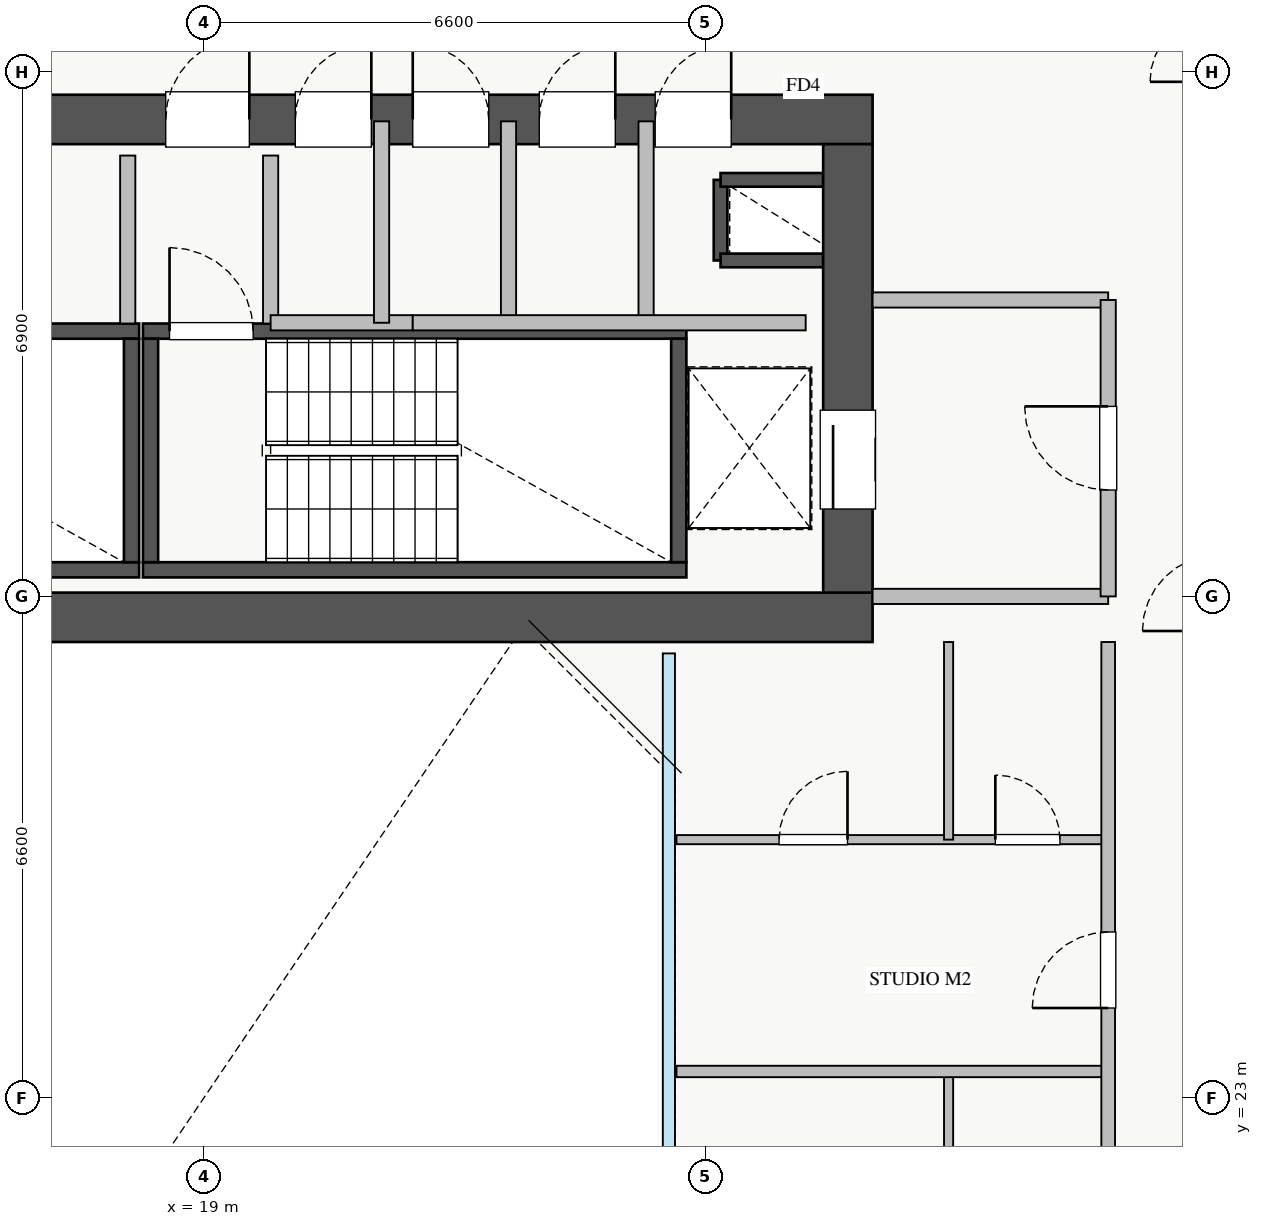
"""IFC4 building model, lengths in metres.
Left out: names, types, materials, properties, quantities, classifications, styles, units other than length and angle.
Written with IfcOpenShell. Run it as: python <this file> out.ifc"""

import sys

from ifc_helpers import new_model, si_unit, direction, frame, frame_2d, origin, place, context, subcontext, project, spatial, rectangle, extrude, source, transform, mapped, element, fill, save


model = new_model("IFC4")
c1 = context("Model", 3, precision=1e-05, world=origin(), true_north=direction((0.0, 1.0)))
c2 = subcontext(c1, "Body", "Model", "MODEL_VIEW")
j1 = project(units=[si_unit("LENGTHUNIT", "METRE"), si_unit("PLANEANGLEUNIT", "RADIAN")], contexts=[c1])
p1 = place(None, origin())
s1 = spatial("IfcSite", under=j1, at=p1, CompositionType="ELEMENT")
p2 = place(p1, origin())
s2 = spatial("IfcBuilding", under=s1, at=p2, CompositionType="ELEMENT")
p3 = place(p2, frame((0.0, 0.0, 123.0)))
s3 = spatial("IfcBuildingStorey", under=s2, at=p3, CompositionType="ELEMENT", Elevation=123.0)
p4 = place(p3, frame((25.8, 34.02, 0.0), z_axis=(0.0, 0.0, 1.0), x_axis=(0.0, 1.0, 0.0)))
e1 = element("IfcWall", 1, at=p4, inside=s3, PredefinedType="SHEAR", context=c2, shape_type="SweptSolid", body=[
    extrude(rectangle(XDim=1.06, YDim=0.18, at=frame_2d((0.53, 0.0))), origin(), (0.0, 0.0, 1.0), 3.07),
])
for number, where, z_axis, x_axis in (
    (2, (25.8, 35.08, 0.0), (0.0, 0.0, 1.0), (1.0, 0.0, 0.0)),
    (3, (25.8, 34.02, 0.0), (0.0, 0.0, 1.0), (1.0, 0.0, 0.0)),
):
    element("IfcWall", number, at=place(p3, frame(where, z_axis=z_axis, x_axis=x_axis)), inside=s3, PredefinedType="SHEAR", context=c2, shape_type="SweptSolid", body=[
        extrude(rectangle(XDim=1.35, YDim=0.18, at=frame_2d((0.675, 0.0))), origin(), (0.0, 0.0, 1.0), 3.07),
    ])
p5 = place(p3, frame((10.85, 29.95, 0.0), z_axis=(0.0, 0.0, 1.0), x_axis=(1.0, 0.0, 0.0)))
e4 = element("IfcWall", 4, at=p5, inside=s3, PredefinedType="SHEAR", context=c2, shape_type="SweptSolid", body=[
    extrude(rectangle(XDim=7.3, YDim=0.2, at=frame_2d((3.65, 0.0))), origin(), (0.0, 0.0, 1.0), 3.25),
])
p6 = place(p3, frame((10.85, 33.09, 0.0), z_axis=(0.0, 0.0, 1.0), x_axis=(1.0, 0.0, 0.0)))
e5 = element("IfcWall", 5, at=p6, inside=s3, PredefinedType="SHEAR", context=c2, shape_type="SweptSolid", body=[
    extrude(rectangle(XDim=7.3, YDim=0.2, at=frame_2d((3.65, 0.0))), origin(), (0.0, 0.0, 1.0), 3.25),
])
p7 = place(p6, frame((0.35, 0.0, 0.0)))
e6 = element("IfcOpeningElement", 6, at=p7, cuts=e5, PredefinedType="OPENING", context=c2, shape_type="SweptSolid", body=[
    extrude(rectangle(XDim=1.1, YDim=2.05, at=frame_2d((0.55, 1.025))), frame((0.0, 0.11, 0.0), z_axis=(0.0, -1.0, 0.0), x_axis=(1.0, 0.0, 0.0)), (0.0, 0.0, 1.0), 0.22),
])
p8 = place(p3, frame((18.05, 30.05, 0.0), z_axis=(0.0, 0.0, 1.0), x_axis=(0.0, 1.0, 0.0)))
e7 = element("IfcWall", 7, at=p8, inside=s3, PredefinedType="SHEAR", context=c2, shape_type="SweptSolid", body=[
    extrude(rectangle(XDim=2.94, YDim=0.2, at=frame_2d((1.47, 0.0))), origin(), (0.0, 0.0, 1.0), 3.25),
])
p9 = place(p3, frame((18.2, 29.95, 0.0), z_axis=(0.0, 0.0, 1.0), x_axis=(1.0, 0.0, 0.0)))
e8 = element("IfcWall", 8, at=p9, inside=s3, PredefinedType="SHEAR", context=c2, shape_type="SweptSolid", body=[
    extrude(rectangle(XDim=7.15, YDim=0.2, at=frame_2d((3.575, 0.0))), origin(), (0.0, 0.0, 1.0), 3.25),
])
p10 = place(p3, frame((18.2, 33.09, 0.0), z_axis=(0.0, 0.0, 1.0), x_axis=(1.0, 0.0, 0.0)))
e9 = element("IfcWall", 9, at=p10, inside=s3, PredefinedType="SHEAR", context=c2, shape_type="SweptSolid", body=[
    extrude(rectangle(XDim=7.15, YDim=0.2, at=frame_2d((3.575, 0.0))), origin(), (0.0, 0.0, 1.0), 3.25),
])
p11 = place(p10, frame((0.35, 0.0, 0.0)))
e10 = element("IfcOpeningElement", 10, at=p11, cuts=e9, PredefinedType="OPENING", context=c2, shape_type="SweptSolid", body=[
    extrude(rectangle(XDim=1.1, YDim=2.05, at=frame_2d((0.55, 1.025))), frame((0.0, 0.11, 0.0), z_axis=(0.0, -1.0, 0.0), x_axis=(1.0, 0.0, 0.0)), (0.0, 0.0, 1.0), 0.22),
])
for number, where, z_axis, x_axis in (
    (11, (18.3, 30.05, 0.0), (0.0, 0.0, 1.0), (0.0, 1.0, 0.0)),
    (12, (25.25, 30.05, 0.0), (0.0, 0.0, 1.0), (0.0, 1.0, 0.0)),
):
    element("IfcWall", number, at=place(p3, frame(where, z_axis=z_axis, x_axis=x_axis)), inside=s3, PredefinedType="SHEAR", context=c2, shape_type="SweptSolid", body=[
        extrude(rectangle(XDim=2.94, YDim=0.2, at=frame_2d((1.47, 0.0))), origin(), (0.0, 0.0, 1.0), 3.25),
    ])
p12 = place(p3, frame((10.2, 29.325, 0.0), z_axis=(0.0, 0.0, 1.0), x_axis=(1.0, 0.0, 0.0)))
e13 = element("IfcWall", 13, at=p12, inside=s3, PredefinedType="SHEAR", context=c2, shape_type="SweptSolid", body=[
    extrude(rectangle(XDim=17.6, YDim=0.65, at=frame_2d((8.8, 0.0))), origin(), (0.0, 0.0, 1.0), 3.25),
])
p13 = place(p3, frame((10.2, 35.875, 0.0), z_axis=(0.0, 0.0, 1.0), x_axis=(1.0, 0.0, 0.0)))
e14 = element("IfcWall", 14, at=p13, inside=s3, PredefinedType="SHEAR", context=c2, shape_type="SweptSolid", body=[
    extrude(rectangle(XDim=17.6, YDim=0.65, at=frame_2d((8.8, 0.0))), origin(), (0.0, 0.0, 1.0), 3.25),
])
p14 = place(p13, frame((1.15, 0.0, 0.0)))
e15 = element("IfcOpeningElement", 15, at=p14, cuts=e14, PredefinedType="OPENING", context=c2, shape_type="SweptSolid", body=[
    extrude(rectangle(XDim=1.1, YDim=2.05, at=frame_2d((0.55, 1.025))), frame((0.0, 0.335, 0.0), z_axis=(0.0, -1.0, 0.0), x_axis=(1.0, 0.0, 0.0)), (0.0, 0.0, 1.0), 0.67),
])
p15 = place(p13, frame((8.3, 0.0, 0.0)))
e16 = element("IfcOpeningElement", 16, at=p15, cuts=e14, PredefinedType="OPENING", context=c2, shape_type="SweptSolid", body=[
    extrude(rectangle(XDim=1.1, YDim=2.05, at=frame_2d((0.55, 1.025))), frame((0.0, 0.335, 0.0), z_axis=(0.0, -1.0, 0.0), x_axis=(1.0, 0.0, 0.0)), (0.0, 0.0, 1.0), 0.67),
])
p16 = place(p13, frame((4.9, 0.0, 0.0)))
e17 = element("IfcOpeningElement", 17, at=p16, cuts=e14, PredefinedType="OPENING", context=c2, shape_type="SweptSolid", body=[
    extrude(rectangle(XDim=1.1, YDim=2.05, at=frame_2d((0.55, 1.025))), frame((0.0, 0.335, 0.0), z_axis=(0.0, -1.0, 0.0), x_axis=(1.0, 0.0, 0.0)), (0.0, 0.0, 1.0), 0.67),
])
p17 = place(p13, frame((14.74, 0.0, 0.0)))
e18 = element("IfcOpeningElement", 18, at=p17, cuts=e14, PredefinedType="OPENING", context=c2, shape_type="SweptSolid", body=[
    extrude(rectangle(XDim=1.0, YDim=2.05, at=frame_2d((0.5, 1.025))), frame((0.0, 0.335, 0.0), z_axis=(0.0, -1.0, 0.0), x_axis=(1.0, 0.0, 0.0)), (0.0, 0.0, 1.0), 0.67),
])
p18 = place(p13, frame((10.005, 0.0, 0.0)))
e19 = element("IfcOpeningElement", 19, at=p18, cuts=e14, PredefinedType="OPENING", context=c2, shape_type="SweptSolid", body=[
    extrude(rectangle(XDim=1.0, YDim=2.05, at=frame_2d((0.5, 1.025))), frame((0.0, 0.335, 0.0), z_axis=(0.0, -1.0, 0.0), x_axis=(1.0, 0.0, 0.0)), (0.0, 0.0, 1.0), 0.67),
])
p19 = place(p13, frame((11.55, 0.0, 0.0)))
e20 = element("IfcOpeningElement", 20, at=p19, cuts=e14, PredefinedType="OPENING", context=c2, shape_type="SweptSolid", body=[
    extrude(rectangle(XDim=1.0, YDim=2.05, at=frame_2d((0.5, 1.025))), frame((0.0, 0.335, 0.0), z_axis=(0.0, -1.0, 0.0), x_axis=(1.0, 0.0, 0.0)), (0.0, 0.0, 1.0), 0.67),
])
p20 = place(p13, frame((13.215, 0.0, 0.0)))
e21 = element("IfcOpeningElement", 21, at=p20, cuts=e14, PredefinedType="OPENING", context=c2, shape_type="SweptSolid", body=[
    extrude(rectangle(XDim=1.0, YDim=2.05, at=frame_2d((0.5, 1.025))), frame((0.0, 0.335, 0.0), z_axis=(0.0, -1.0, 0.0), x_axis=(1.0, 0.0, 0.0)), (0.0, 0.0, 1.0), 0.67),
])
p21 = place(p3, frame((27.475, 29.65, 0.0), z_axis=(0.0, 0.0, 1.0), x_axis=(0.0, 1.0, 0.0)))
e22 = element("IfcWall", 22, at=p21, inside=s3, PredefinedType="SHEAR", context=c2, shape_type="SweptSolid", body=[
    extrude(rectangle(XDim=5.9, YDim=0.65, at=frame_2d((2.95, 0.0))), origin(), (0.0, 0.0, 1.0), 3.25),
])
p22 = place(p21, frame((1.1, 0.0, 0.0)))
e23 = element("IfcOpeningElement", 23, at=p22, cuts=e22, PredefinedType="OPENING", context=c2, shape_type="SweptSolid", body=[
    extrude(rectangle(XDim=1.3, YDim=2.05, at=frame_2d((0.65, 1.025))), frame((0.0, 0.335, 0.0), z_axis=(0.0, -1.0, 0.0), x_axis=(1.0, 0.0, 0.0)), (0.0, 0.0, 1.0), 0.67),
])
for number, where, z_axis, x_axis in (
    (24, (27.8, 29.6, 0.0), (0.0, 0.0, 1.0), (1.0, 0.0, 0.0)),
    (25, (27.8, 33.5, 0.0), (0.0, 0.0, 1.0), (1.0, 0.0, 0.0)),
):
    element("IfcWall", number, at=place(p3, frame(where, z_axis=z_axis, x_axis=x_axis)), inside=s3, PredefinedType="PARTITIONING", context=c2, shape_type="SweptSolid", body=[
        extrude(rectangle(XDim=3.1, YDim=0.2, at=frame_2d((1.55, 0.0))), origin(), (0.0, 0.0, 1.0), 3.07),
    ])
p23 = place(p3, frame((30.9, 29.6, 0.0), z_axis=(0.0, 0.0, 1.0), x_axis=(0.0, 1.0, 0.0)))
e26 = element("IfcWall", 26, at=p23, inside=s3, PredefinedType="PARTITIONING", context=c2, shape_type="SweptSolid", body=[
    extrude(rectangle(XDim=3.9, YDim=0.2, at=frame_2d((1.95, 0.0))), origin(), (0.0, 0.0, 1.0), 3.07),
])
p24 = place(p23, frame((1.4, 0.0, 0.0)))
e27 = element("IfcOpeningElement", 27, at=p24, cuts=e26, PredefinedType="OPENING", context=c2, shape_type="SweptSolid", body=[
    extrude(rectangle(XDim=1.1, YDim=2.05, at=frame_2d((0.55, 1.025))), frame((0.0, 0.11, 0.0), z_axis=(0.0, -1.0, 0.0), x_axis=(1.0, 0.0, 0.0)), (0.0, 0.0, 1.0), 0.22),
])
for number, where, z_axis, x_axis in (
    (28, (18.0, 33.19, 0.0), (0.0, 0.0, 1.0), (0.0, 1.0, 0.0)),
    (29, (19.88, 33.19, 0.0), (0.0, 0.0, 1.0), (0.0, 1.0, 0.0)),
):
    element("IfcWall", number, at=place(p3, frame(where, z_axis=z_axis, x_axis=x_axis)), inside=s3, PredefinedType="PARTITIONING", context=c2, shape_type="SweptSolid", body=[
        extrude(rectangle(XDim=2.21, YDim=0.2, at=frame_2d((1.105, 0.0))), origin(), (0.0, 0.0, 1.0), 3.07),
    ])
p25 = place(p3, frame((24.82, 33.2, 0.0), z_axis=(0.0, 0.0, 1.0), x_axis=(0.0, 1.0, 0.0)))
e30 = element("IfcWall", 30, at=p25, inside=s3, PredefinedType="PARTITIONING", context=c2, shape_type="SweptSolid", body=[
    extrude(rectangle(XDim=2.65, YDim=0.2, at=frame_2d((1.325, 0.0))), origin(), (0.0, 0.0, 1.0), 3.07),
])
p26 = place(p3, frame((19.88, 33.2, 0.0), z_axis=(0.0, 0.0, 1.0), x_axis=(1.0, 0.0, 0.0)))
e31 = element("IfcWall", 31, at=p26, inside=s3, PredefinedType="PARTITIONING", context=c2, shape_type="SweptSolid", body=[
    extrude(rectangle(XDim=1.87, YDim=0.2, at=frame_2d((0.935, 0.0))), origin(), (0.0, 0.0, 1.0), 3.07),
])
for number, where, z_axis, x_axis in (
    (32, (21.34, 33.2, 0.0), (0.0, 0.0, 1.0), (0.0, 1.0, 0.0)),
    (33, (23.01, 33.2, 0.0), (0.0, 0.0, 1.0), (0.0, 1.0, 0.0)),
):
    element("IfcWall", number, at=place(p3, frame(where, z_axis=z_axis, x_axis=x_axis)), inside=s3, PredefinedType="PARTITIONING", context=c2, shape_type="SweptSolid", body=[
        extrude(rectangle(XDim=2.65, YDim=0.2, at=frame_2d((1.325, 0.0))), origin(), (0.0, 0.0, 1.0), 3.07),
    ])
p27 = place(p3, frame((21.75, 33.2, 0.0), z_axis=(0.0, 0.0, 1.0), x_axis=(1.0, 0.0, 0.0)))
e34 = element("IfcWall", 34, at=p27, inside=s3, PredefinedType="PARTITIONING", context=c2, shape_type="SweptSolid", body=[
    extrude(rectangle(XDim=5.17, YDim=0.2, at=frame_2d((2.585, 0.0))), origin(), (0.0, 0.0, 1.0), 3.07),
])
p28 = place(p3, frame((28.8, 20.43, 0.0), z_axis=(0.0, 0.0, 1.0), x_axis=(0.0, 1.0, 0.0)))
e35 = element("IfcWall", 35, at=p28, inside=s3, PredefinedType="PLUMBINGWALL", context=c2, shape_type="SweptSolid", body=[
    extrude(rectangle(XDim=2.92, YDim=0.12, at=frame_2d((1.46, 0.0))), origin(), (0.0, 0.0, 1.0), 3.07),
])
p29 = place(p3, frame((25.22, 26.4, 0.0), z_axis=(0.0, 0.0, 1.0), x_axis=(1.0, 0.0, 0.0)))
e36 = element("IfcWall", 36, at=p29, inside=s3, PredefinedType="PLUMBINGWALL", context=c2, shape_type="SweptSolid", body=[
    extrude(rectangle(XDim=5.68, YDim=0.12, at=frame_2d((2.84, 0.0))), origin(), (0.0, 0.0, 1.0), 3.07),
])
p30 = place(p29, frame((1.35, 0.0, 0.0)))
e37 = element("IfcOpeningElement", 37, at=p30, cuts=e36, PredefinedType="OPENING", context=c2, shape_type="SweptSolid", body=[
    extrude(rectangle(XDim=0.9, YDim=2.05, at=frame_2d((0.45, 1.025))), frame((0.0, 0.07, 0.0), z_axis=(0.0, -1.0, 0.0), x_axis=(1.0, 0.0, 0.0)), (0.0, 0.0, 1.0), 0.14),
])
p31 = place(p29, frame((4.195, 0.0, 0.0)))
e38 = element("IfcOpeningElement", 38, at=p31, cuts=e36, PredefinedType="OPENING", context=c2, shape_type="SweptSolid", body=[
    extrude(rectangle(XDim=0.85, YDim=2.05, at=frame_2d((0.425, 1.025))), frame((0.0, 0.07, 0.0), z_axis=(0.0, -1.0, 0.0), x_axis=(1.0, 0.0, 0.0)), (0.0, 0.0, 1.0), 0.14),
])
p32 = place(p3, frame((28.8, 26.4, 0.0), z_axis=(0.0, 0.0, 1.0), x_axis=(0.0, 1.0, 0.0)))
e39 = element("IfcWall", 39, at=p32, inside=s3, PredefinedType="PLUMBINGWALL", context=c2, shape_type="SweptSolid", body=[
    extrude(rectangle(XDim=2.6, YDim=0.12, at=frame_2d((1.3, 0.0))), origin(), (0.0, 0.0, 1.0), 3.07),
])
p33 = place(p3, frame((25.22, 23.35, 0.0), z_axis=(0.0, 0.0, 1.0), x_axis=(1.0, 0.0, 0.0)))
e40 = element("IfcWall", 40, at=p33, inside=s3, PredefinedType="PARTITIONING", context=c2, shape_type="SweptSolid", body=[
    extrude(rectangle(XDim=5.68, YDim=0.15, at=frame_2d((2.84, 0.0))), origin(), (0.0, 0.0, 1.0), 3.07),
])
p34 = place(p3, frame((30.9, 17.0, 0.0), z_axis=(0.0, 0.0, 1.0), x_axis=(0.0, 1.0, 0.0)))
e41 = element("IfcWall", 41, at=p34, inside=s3, PredefinedType="PARTITIONING", context=c2, shape_type="SweptSolid", body=[
    extrude(rectangle(XDim=12.0, YDim=0.18, at=frame_2d((6.0, 0.0))), origin(), (0.0, 0.0, 1.0), 3.07),
])
p35 = place(p34, frame((1.025, 0.0, 0.0)))
e42 = element("IfcOpeningElement", 42, at=p35, cuts=e41, PredefinedType="OPENING", context=c2, shape_type="SweptSolid", body=[
    extrude(rectangle(XDim=1.0, YDim=2.05, at=frame_2d((0.5, 1.025))), frame((0.0, 0.1, 0.0), z_axis=(0.0, -1.0, 0.0), x_axis=(1.0, 0.0, 0.0)), (0.0, 0.0, 1.0), 0.2),
])
p36 = place(p34, frame((7.185, 0.0, 0.0)))
e43 = element("IfcOpeningElement", 43, at=p36, cuts=e41, PredefinedType="OPENING", context=c2, shape_type="SweptSolid", body=[
    extrude(rectangle(XDim=1.0, YDim=2.05, at=frame_2d((0.5, 1.025))), frame((0.0, 0.1, 0.0), z_axis=(0.0, -1.0, 0.0), x_axis=(1.0, 0.0, 0.0)), (0.0, 0.0, 1.0), 0.2),
])
m1 = source(origin(), c2, "Body", "SweptSolid", [
    extrude(rectangle(XDim=1.3, YDim=2.05, at=frame_2d((0.65, 1.025))), frame((0.0, 0.025, 0.0), z_axis=(0.0, -1.0, 0.0), x_axis=(1.0, 0.0, 0.0)), (0.0, 0.0, 1.0), 0.05),
])
p37 = place(p22, origin())
e44 = element("IfcDoor", 44, at=p37, inside=s3, OperationType="SLIDING_TO_LEFT", PredefinedType="DOOR", context=c2, shape_type="MappedRepresentation", body=[
    mapped(m1, transform((0.0, 0.0, 0.0), x_axis=(1.0, 0.0, 0.0), y_axis=(0.0, 1.0, 0.0), z_axis=(0.0, 0.0, 1.0), scale=1.0)),
])
fill(e23, e44)
m2 = source(origin(), c2, "Body", "SweptSolid", [
    extrude(rectangle(XDim=1.1, YDim=2.05, at=frame_2d((0.55, 1.025))), frame((0.0, 0.025, 0.0), z_axis=(0.0, -1.0, 0.0), x_axis=(1.0, 0.0, 0.0)), (0.0, 0.0, 1.0), 0.05),
])
p38 = place(p15, origin())
e45 = element("IfcDoor", 45, at=p38, inside=s3, OperationType="SINGLE_SWING_RIGHT", PredefinedType="DOOR", context=c2, shape_type="MappedRepresentation", body=[
    mapped(m2, transform((0.0, 0.0, 0.0), x_axis=(1.0, 0.0, 0.0), y_axis=(0.0, 1.0, 0.0), z_axis=(0.0, 0.0, 1.0), scale=1.0)),
])
fill(e16, e45)
p39 = place(p11, origin())
e46 = element("IfcDoor", 46, at=p39, inside=s3, OperationType="SINGLE_SWING_LEFT", PredefinedType="DOOR", context=c2, shape_type="MappedRepresentation", body=[
    mapped(m2, transform((0.0, 0.0, 0.0), x_axis=(1.0, 0.0, 0.0), y_axis=(0.0, 1.0, 0.0), z_axis=(0.0, 0.0, 1.0), scale=1.0)),
])
fill(e10, e46)
m3 = source(origin(), c2, "Body", "SweptSolid", [
    extrude(rectangle(XDim=1.0, YDim=2.05, at=frame_2d((0.5, 1.025))), frame((0.0, 0.025, 0.0), z_axis=(0.0, -1.0, 0.0), x_axis=(1.0, 0.0, 0.0)), (0.0, 0.0, 1.0), 0.05),
])
p40 = place(p17, origin())
e47 = element("IfcDoor", 47, at=p40, inside=s3, OperationType="SINGLE_SWING_RIGHT", PredefinedType="DOOR", context=c2, shape_type="MappedRepresentation", body=[
    mapped(m3, transform((0.0, 0.0, 0.0), x_axis=(1.0, 0.0, 0.0), y_axis=(0.0, 1.0, 0.0), z_axis=(0.0, 0.0, 1.0), scale=1.0)),
])
fill(e18, e47)
p41 = place(p18, origin())
e48 = element("IfcDoor", 48, at=p41, inside=s3, OperationType="SINGLE_SWING_RIGHT", PredefinedType="DOOR", context=c2, shape_type="MappedRepresentation", body=[
    mapped(m3, transform((0.0, 0.0, 0.0), x_axis=(1.0, 0.0, 0.0), y_axis=(0.0, 1.0, 0.0), z_axis=(0.0, 0.0, 1.0), scale=1.0)),
])
fill(e19, e48)
p42 = place(p19, origin())
e49 = element("IfcDoor", 49, at=p42, inside=s3, OperationType="SINGLE_SWING_LEFT", PredefinedType="DOOR", context=c2, shape_type="MappedRepresentation", body=[
    mapped(m3, transform((0.0, 0.0, 0.0), x_axis=(1.0, 0.0, 0.0), y_axis=(0.0, 1.0, 0.0), z_axis=(0.0, 0.0, 1.0), scale=1.0)),
])
fill(e20, e49)
p43 = place(p20, origin())
e50 = element("IfcDoor", 50, at=p43, inside=s3, OperationType="SINGLE_SWING_RIGHT", PredefinedType="DOOR", context=c2, shape_type="MappedRepresentation", body=[
    mapped(m3, transform((0.0, 0.0, 0.0), x_axis=(1.0, 0.0, 0.0), y_axis=(0.0, 1.0, 0.0), z_axis=(0.0, 0.0, 1.0), scale=1.0)),
])
fill(e21, e50)
p44 = place(p24, origin())
e51 = element("IfcDoor", 51, at=p44, inside=s3, OperationType="SINGLE_SWING_RIGHT", PredefinedType="DOOR", context=c2, shape_type="MappedRepresentation", body=[
    mapped(m2, transform((0.0, 0.0, 0.0), x_axis=(1.0, 0.0, 0.0), y_axis=(0.0, 1.0, 0.0), z_axis=(0.0, 0.0, 1.0), scale=1.0)),
])
fill(e27, e51)
m4 = source(origin(), c2, "Body", "SweptSolid", [
    extrude(rectangle(XDim=0.9, YDim=2.05, at=frame_2d((0.45, 1.025))), frame((0.0, 0.025, 0.0), z_axis=(0.0, -1.0, 0.0), x_axis=(1.0, 0.0, 0.0)), (0.0, 0.0, 1.0), 0.05),
])
p45 = place(p30, origin())
e52 = element("IfcDoor", 52, at=p45, inside=s3, OperationType="SINGLE_SWING_RIGHT", PredefinedType="DOOR", context=c2, shape_type="MappedRepresentation", body=[
    mapped(m4, transform((0.0, 0.0, 0.0), x_axis=(1.0, 0.0, 0.0), y_axis=(0.0, 1.0, 0.0), z_axis=(0.0, 0.0, 1.0), scale=1.0)),
])
fill(e37, e52)
m5 = source(origin(), c2, "Body", "SweptSolid", [
    extrude(rectangle(XDim=0.85, YDim=2.05, at=frame_2d((0.425, 1.025))), frame((0.0, 0.025, 0.0), z_axis=(0.0, -1.0, 0.0), x_axis=(1.0, 0.0, 0.0)), (0.0, 0.0, 1.0), 0.05),
])
p46 = place(p31, origin())
e53 = element("IfcDoor", 53, at=p46, inside=s3, OperationType="SINGLE_SWING_LEFT", PredefinedType="DOOR", context=c2, shape_type="MappedRepresentation", body=[
    mapped(m5, transform((0.0, 0.0, 0.0), x_axis=(1.0, 0.0, 0.0), y_axis=(0.0, 1.0, 0.0), z_axis=(0.0, 0.0, 1.0), scale=1.0)),
])
fill(e38, e53)
p47 = place(p36, origin())
e54 = element("IfcDoor", 54, at=p47, inside=s3, OperationType="SINGLE_SWING_LEFT", PredefinedType="DOOR", context=c2, shape_type="MappedRepresentation", body=[
    mapped(m3, transform((0.0, 0.0, 0.0), x_axis=(1.0, 0.0, 0.0), y_axis=(0.0, 1.0, 0.0), z_axis=(0.0, 0.0, 1.0), scale=1.0)),
])
fill(e43, e54)
save(model, sys.argv[1])
